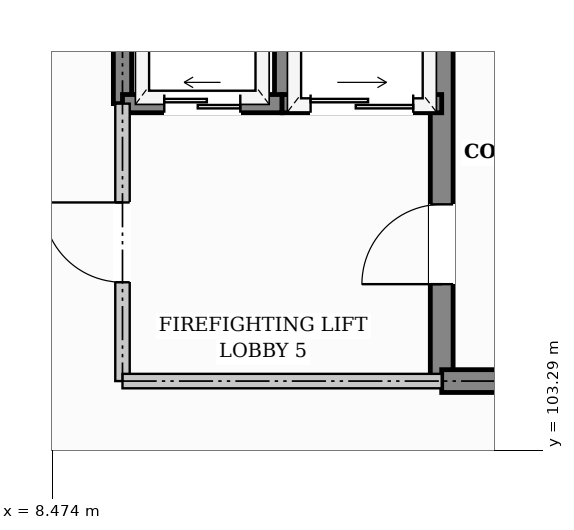
"""IFC4 building model, lengths in metres.
Left out: names, types, materials, properties, quantities, classifications, styles, units other than length and angle.
Written with IfcOpenShell. Run it as: python <this file> out.ifc"""

import sys

from ifc_helpers import new_model, si_unit, direction, frame, frame_2d, origin, place, context, subcontext, project, spatial, rectangle, extrude, element, fill, save


model = new_model("IFC4")
c1 = context("Model", 3, precision=1e-05, world=origin(), true_north=direction((0.0, 1.0)))
c2 = subcontext(c1, "Body", "Model", "MODEL_VIEW")
j1 = project(units=[si_unit("LENGTHUNIT", "METRE"), si_unit("PLANEANGLEUNIT", "RADIAN")], contexts=[c1])
p1 = place(None, origin())
s1 = spatial("IfcSite", under=j1, at=p1, CompositionType="ELEMENT")
p2 = place(p1, origin())
s2 = spatial("IfcBuilding", under=s1, at=p2, CompositionType="ELEMENT")
p3 = place(p2, frame((0.0, 0.0, 9.6)))
s3 = spatial("IfcBuildingStorey", under=s2, at=p3, CompositionType="ELEMENT", Elevation=9.6)
p4 = place(p3, frame((13.6, 104.2, 0.0), z_axis=(0.0, 0.0, 1.0), x_axis=(0.0, 1.0, 0.0)))
e1 = element("IfcWall", 1, at=p4, inside=s3, PredefinedType="SHEAR", context=c2, shape_type="SweptSolid", body=[
    extrude(rectangle(XDim=6.0, YDim=0.3, at=frame_2d((3.0, 0.0))), origin(), (0.0, 0.0, 1.0), 3.32),
])
p5 = place(p4, frame((1.275, 0.0, 0.0)))
e2 = element("IfcOpeningElement", 2, at=p5, cuts=e1, PredefinedType="OPENING", context=c2, shape_type="SweptSolid", body=[
    extrude(rectangle(XDim=1.05, YDim=2.15, at=frame_2d((0.525, 1.075))), frame((0.0, 0.16, 0.0), z_axis=(0.0, -1.0, 0.0), x_axis=(1.0, 0.0, 0.0)), (0.0, 0.0, 1.0), 0.32),
])
p6 = place(p3, frame((13.6, 104.2, 0.0), z_axis=(0.0, 0.0, 1.0), x_axis=(1.0, 0.0, 0.0)))
e3 = element("IfcWall", 3, at=p6, inside=s3, PredefinedType="SHEAR", context=c2, shape_type="SweptSolid", body=[
    extrude(rectangle(XDim=7.0, YDim=0.3, at=frame_2d((3.5, 0.0))), origin(), (0.0, 0.0, 1.0), 3.32),
])
p7 = place(p3, frame((9.4, 107.85, 0.0), z_axis=(0.0, 0.0, 1.0), x_axis=(0.0, 1.0, 0.0)))
e4 = element("IfcWall", 4, at=p7, inside=s3, PredefinedType="SHEAR", context=c2, shape_type="SweptSolid", body=[
    extrude(rectangle(XDim=2.35, YDim=0.24, at=frame_2d((1.175, 0.0))), origin(), (0.0, 0.0, 1.0), 3.32),
])
p8 = place(p3, frame((11.5, 107.85, 0.0), z_axis=(0.0, 0.0, 1.0), x_axis=(0.0, 1.0, 0.0)))
e5 = element("IfcWall", 5, at=p8, inside=s3, PredefinedType="SHEAR", context=c2, shape_type="SweptSolid", body=[
    extrude(rectangle(XDim=2.35, YDim=0.2, at=frame_2d((1.175, 0.0))), origin(), (0.0, 0.0, 1.0), 3.32),
])
p9 = place(p3, frame((9.4, 107.85, 0.0), z_axis=(0.0, 0.0, 1.0), x_axis=(1.0, 0.0, 0.0)))
e6 = element("IfcWall", 6, at=p9, inside=s3, PredefinedType="SHEAR", context=c2, shape_type="SweptSolid", body=[
    extrude(rectangle(XDim=2.1, YDim=0.24, at=frame_2d((1.05, 0.0))), origin(), (0.0, 0.0, 1.0), 3.32),
])
p10 = place(p9, frame((0.55, 0.0, 0.0)))
e7 = element("IfcOpeningElement", 7, at=p10, cuts=e6, PredefinedType="OPENING", context=c2, shape_type="SweptSolid", body=[
    extrude(rectangle(XDim=1.0, YDim=2.1, at=frame_2d((0.5, 1.05))), frame((0.0, 0.13, 0.0), z_axis=(0.0, -1.0, 0.0), x_axis=(1.0, 0.0, 0.0)), (0.0, 0.0, 1.0), 0.26),
])
p11 = place(p3, frame((11.5, 107.85, 0.0), z_axis=(0.0, 0.0, 1.0), x_axis=(1.0, 0.0, 0.0)))
e8 = element("IfcWall", 8, at=p11, inside=s3, PredefinedType="SHEAR", context=c2, shape_type="SweptSolid", body=[
    extrude(rectangle(XDim=2.1, YDim=0.24, at=frame_2d((1.05, 0.0))), origin(), (0.0, 0.0, 1.0), 3.32),
])
p12 = place(p11, frame((0.375, 0.0, 0.0)))
e9 = element("IfcOpeningElement", 9, at=p12, cuts=e8, PredefinedType="OPENING", context=c2, shape_type="SweptSolid", body=[
    extrude(rectangle(XDim=1.35, YDim=2.2, at=frame_2d((0.675, 1.1))), frame((0.0, 0.13, 0.0), z_axis=(0.0, -1.0, 0.0), x_axis=(1.0, 0.0, 0.0)), (0.0, 0.0, 1.0), 0.26),
])
p13 = place(p3, frame((9.4, 104.2, 0.0), z_axis=(0.0, 0.0, 1.0), x_axis=(0.0, 1.0, 0.0)))
e10 = element("IfcWall", 10, at=p13, inside=s3, PredefinedType="PARTITIONING", context=c2, shape_type="SweptSolid", body=[
    extrude(rectangle(XDim=3.65, YDim=0.19, at=frame_2d((1.825, 0.0))), origin(), (0.0, 0.0, 1.0), 3.32),
])
p14 = place(p13, frame((1.3, 0.0, 0.0)))
e11 = element("IfcOpeningElement", 11, at=p14, cuts=e10, PredefinedType="OPENING", context=c2, shape_type="SweptSolid", body=[
    extrude(rectangle(XDim=1.05, YDim=2.15, at=frame_2d((0.525, 1.075))), frame((0.0, 0.105, 0.0), z_axis=(0.0, -1.0, 0.0), x_axis=(1.0, 0.0, 0.0)), (0.0, 0.0, 1.0), 0.21),
])
p15 = place(p3, frame((9.4, 104.2, 0.0), z_axis=(0.0, 0.0, 1.0), x_axis=(1.0, 0.0, 0.0)))
e12 = element("IfcWall", 12, at=p15, inside=s3, PredefinedType="PARTITIONING", context=c2, shape_type="SweptSolid", body=[
    extrude(rectangle(XDim=4.2, YDim=0.19, at=frame_2d((2.1, 0.0))), origin(), (0.0, 0.0, 1.0), 3.32),
])
p16 = place(p5, origin())
e13 = element("IfcDoor", 13, at=p16, inside=s3, OperationType="SINGLE_SWING_LEFT", PredefinedType="DOOR", context=c2, shape_type="SweptSolid", body=[
    extrude(rectangle(XDim=1.05, YDim=2.15, at=frame_2d((0.525, 1.075))), frame((0.0, 0.025, 0.0), z_axis=(0.0, -1.0, 0.0), x_axis=(1.0, 0.0, 0.0)), (0.0, 0.0, 1.0), 0.05),
])
fill(e2, e13)
p17 = place(p10, origin())
e14 = element("IfcDoor", 14, at=p17, inside=s3, OperationType="SLIDING_TO_LEFT", PredefinedType="DOOR", context=c2, shape_type="SweptSolid", body=[
    extrude(rectangle(XDim=1.0, YDim=2.1, at=frame_2d((0.5, 1.05))), frame((0.0, 0.025, 0.0), z_axis=(0.0, -1.0, 0.0), x_axis=(1.0, 0.0, 0.0)), (0.0, 0.0, 1.0), 0.05),
])
fill(e7, e14)
p18 = place(p12, origin())
e15 = element("IfcDoor", 15, at=p18, inside=s3, OperationType="SLIDING_TO_RIGHT", PredefinedType="DOOR", context=c2, shape_type="SweptSolid", body=[
    extrude(rectangle(XDim=1.35, YDim=2.2, at=frame_2d((0.675, 1.1))), frame((0.0, 0.025, 0.0), z_axis=(0.0, -1.0, 0.0), x_axis=(1.0, 0.0, 0.0)), (0.0, 0.0, 1.0), 0.05),
])
fill(e9, e15)
p19 = place(p14, origin())
e16 = element("IfcDoor", 16, at=p19, inside=s3, OperationType="SINGLE_SWING_RIGHT", PredefinedType="DOOR", context=c2, shape_type="SweptSolid", body=[
    extrude(rectangle(XDim=1.05, YDim=2.15, at=frame_2d((0.525, 1.075))), frame((0.0, 0.025, 0.0), z_axis=(0.0, -1.0, 0.0), x_axis=(1.0, 0.0, 0.0)), (0.0, 0.0, 1.0), 0.05),
])
fill(e11, e16)
save(model, sys.argv[1])
